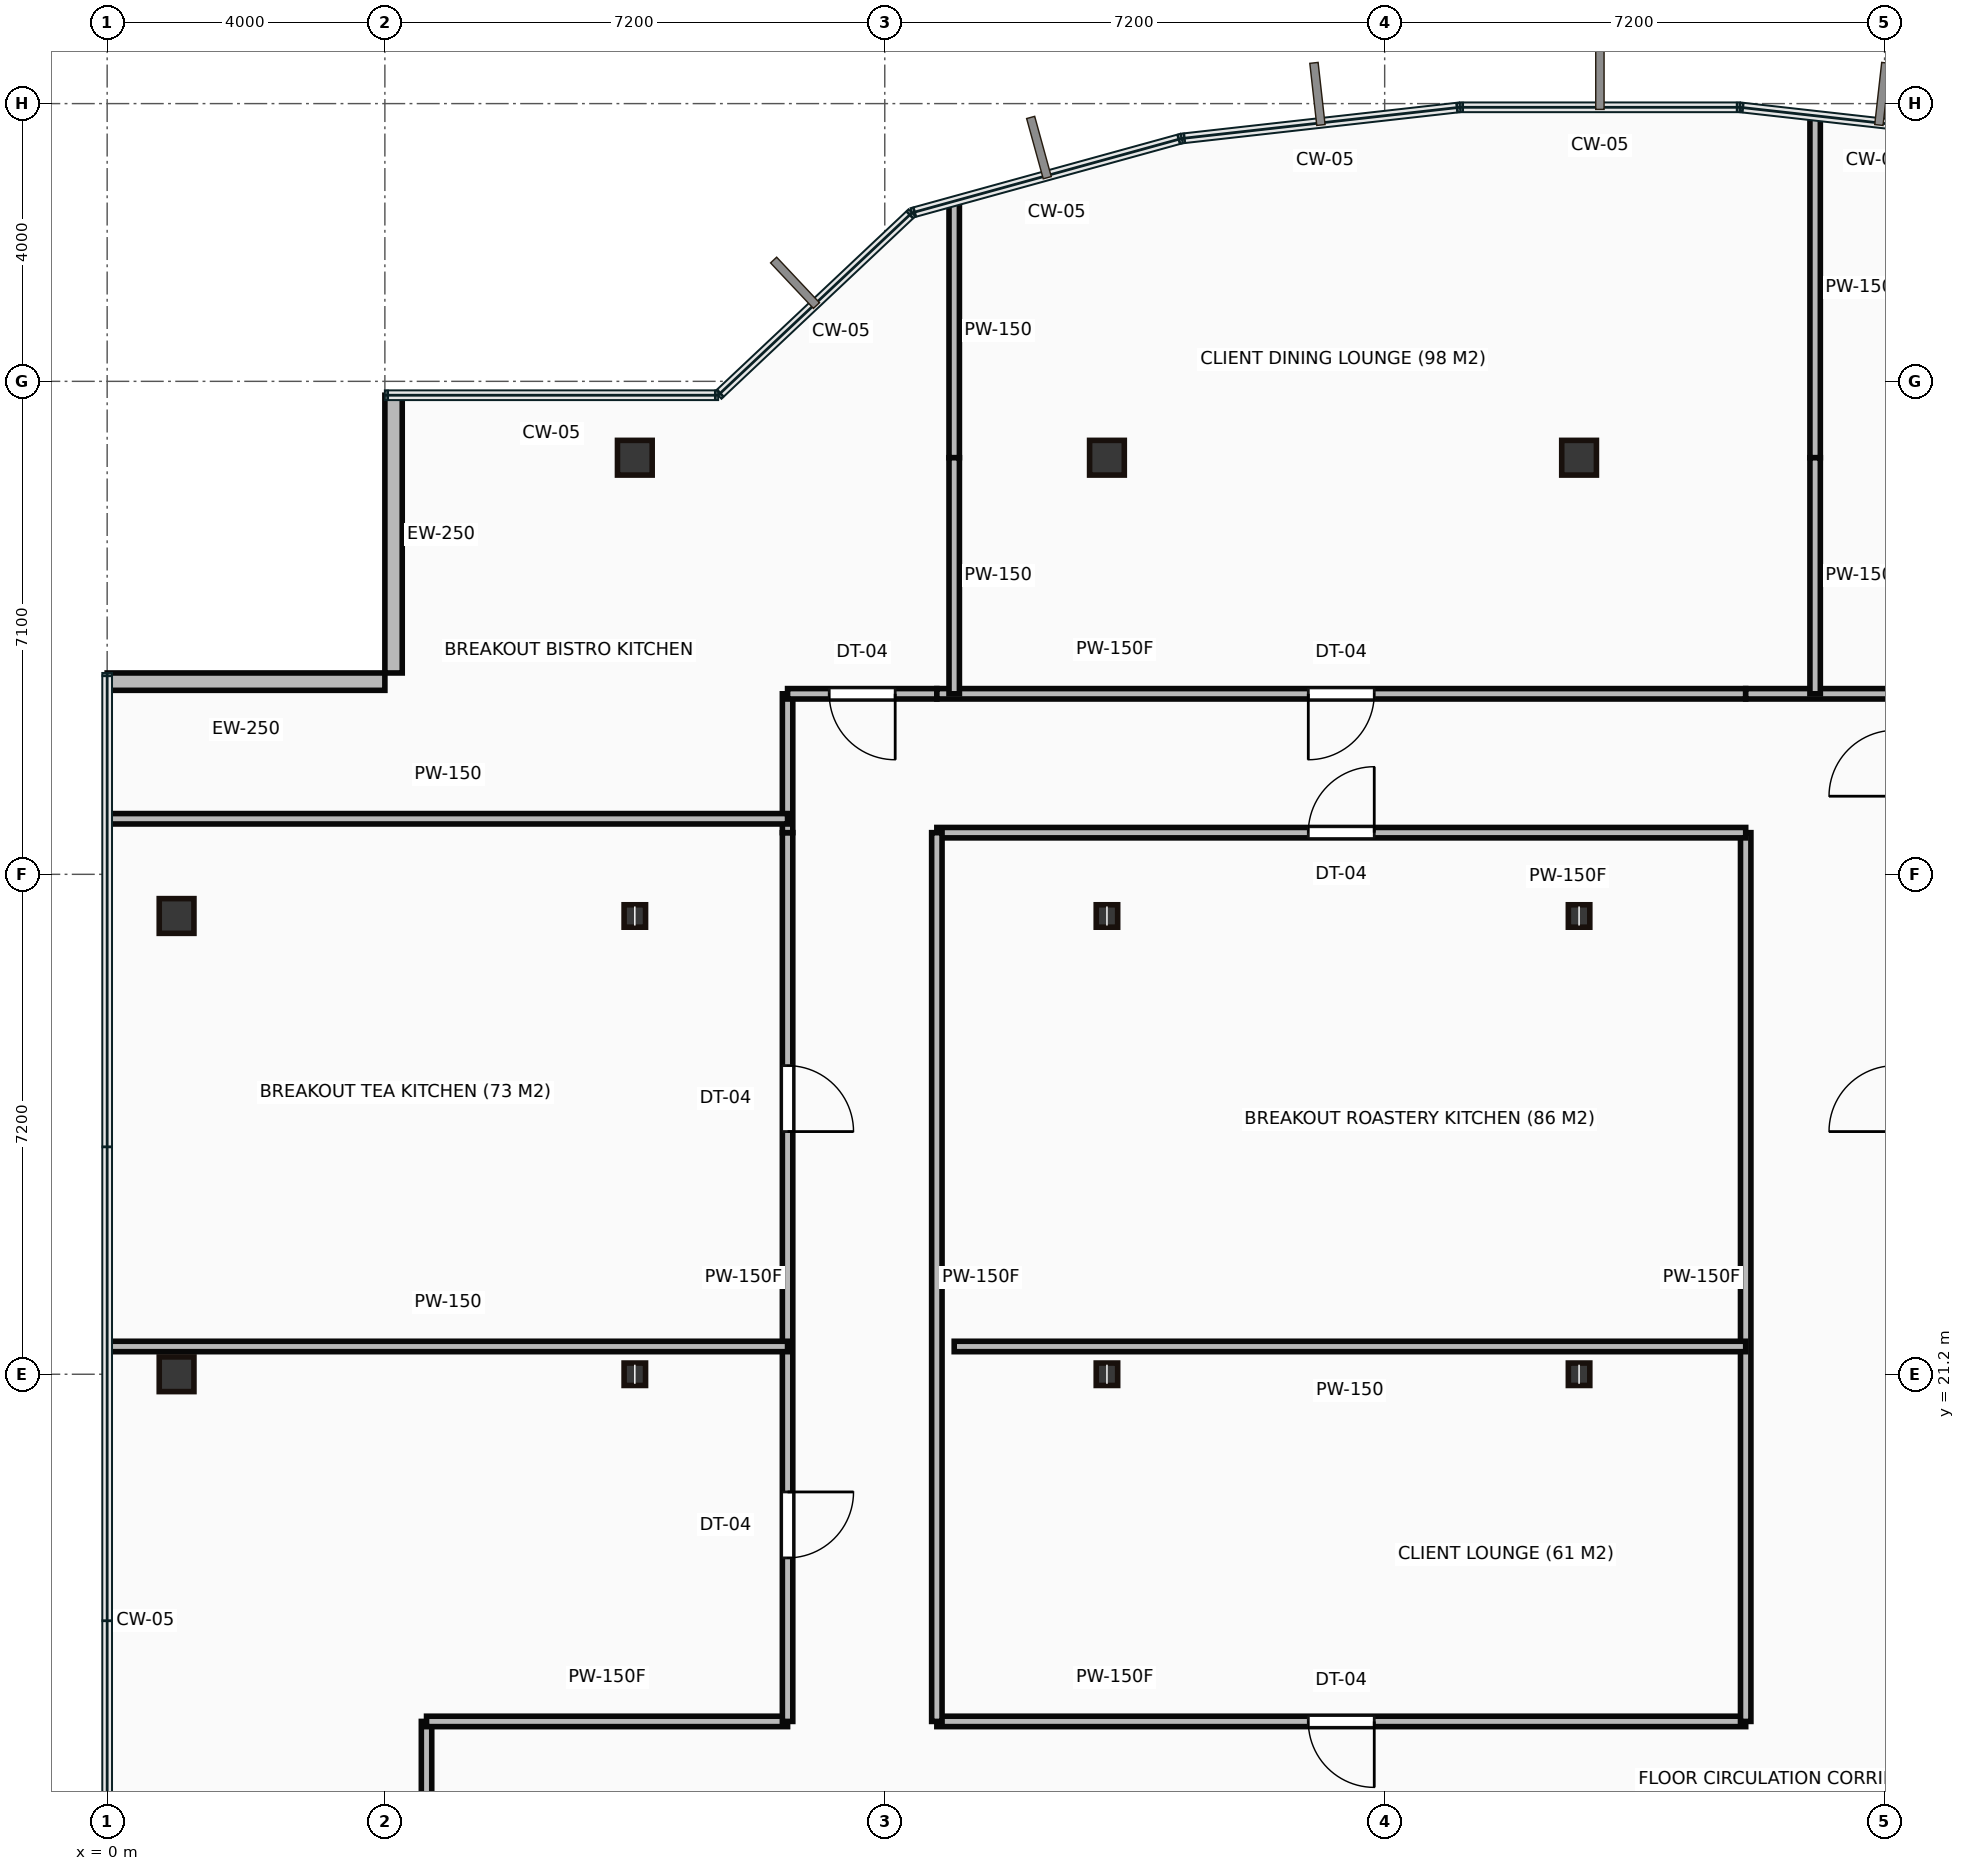
"""IFC4 building model, lengths in metres.
Left out: names, types, materials, properties, quantities, classifications, styles, units other than length and angle.
Written with IfcOpenShell. Run it as: python <this file> out.ifc"""

import sys

from ifc_helpers import new_model, si_unit, direction, frame, frame_2d, origin, origin_2d, place, context, subcontext, project, spatial, rectangle, hollow_rectangle, i_section, extrude, source, transform, mapped, element, fill, save


model = new_model("IFC4")
c1 = context("Model", 3, precision=1e-05, world=origin(), true_north=direction((0.0, 1.0)))
c2 = subcontext(c1, "Body", "Model", "MODEL_VIEW")
j1 = project(units=[si_unit("LENGTHUNIT", "METRE"), si_unit("PLANEANGLEUNIT", "RADIAN")], contexts=[c1])
p1 = place(None, origin())
s1 = spatial("IfcSite", under=j1, at=p1, CompositionType="ELEMENT")
p2 = place(p1, origin())
s2 = spatial("IfcBuilding", under=s1, at=p2, CompositionType="ELEMENT")
p3 = place(p2, frame((0.0, 0.0, 277.05)))
s3 = spatial("IfcBuildingStorey", under=s2, at=p3, CompositionType="ELEMENT", Elevation=277.05)
m1 = source(origin(), c2, "Body", "SweptSolid", [
    extrude(hollow_rectangle(XDim=0.5, YDim=0.5, WallThickness=0.022, at=origin_2d()), origin(), (0.0, 0.0, 1.0), 3.65),
])
for number, where, z_axis, x_axis in (
    (1, (1.0, 21.2, 0.0), (0.0, 0.0, 1.0), (1.0, 0.0, 0.0)),
    (2, (1.0, 27.8, 0.0), (0.0, 0.0, 1.0), (1.0, 0.0, 0.0)),
):
    element("IfcColumn", number, at=place(p3, frame(where, z_axis=z_axis, x_axis=x_axis)), inside=s3, PredefinedType="COLUMN", context=c2, shape_type="MappedRepresentation", body=[
        mapped(m1, transform((0.0, 0.0, 0.0))),
    ])
m2 = source(origin(), c2, "Body", "SweptSolid", [
    extrude(i_section(OverallWidth=0.309, OverallDepth=0.323, WebThickness=0.014, FlangeThickness=0.023, at=origin_2d()), origin(), (0.0, 0.0, 1.0), 3.65),
])
for number, where, z_axis, x_axis in (
    (3, (7.6, 21.2, 0.0), (0.0, 0.0, 1.0), (1.0, 0.0, 0.0)),
    (4, (7.6, 27.8, 0.0), (0.0, 0.0, 1.0), (1.0, 0.0, 0.0)),
):
    element("IfcColumn", number, at=place(p3, frame(where, z_axis=z_axis, x_axis=x_axis)), inside=s3, PredefinedType="COLUMN", context=c2, shape_type="MappedRepresentation", body=[
        mapped(m2, transform((0.0, 0.0, 0.0))),
    ])
p4 = place(p3, frame((7.6, 34.4, 0.0), z_axis=(0.0, 0.0, 1.0), x_axis=(1.0, 0.0, 0.0)))
e5 = element("IfcColumn", 5, at=p4, inside=s3, PredefinedType="COLUMN", context=c2, shape_type="MappedRepresentation", body=[
    mapped(m1, transform((0.0, 0.0, 0.0))),
])
for number, where, z_axis, x_axis in (
    (6, (14.4, 21.2, 0.0), (0.0, 0.0, 1.0), (1.0, 0.0, 0.0)),
    (7, (14.4, 27.8, 0.0), (0.0, 0.0, 1.0), (1.0, 0.0, 0.0)),
):
    element("IfcColumn", number, at=place(p3, frame(where, z_axis=z_axis, x_axis=x_axis)), inside=s3, PredefinedType="COLUMN", context=c2, shape_type="MappedRepresentation", body=[
        mapped(m2, transform((0.0, 0.0, 0.0))),
    ])
p5 = place(p3, frame((14.4, 34.4, 0.0), z_axis=(0.0, 0.0, 1.0), x_axis=(1.0, 0.0, 0.0)))
e8 = element("IfcColumn", 8, at=p5, inside=s3, PredefinedType="COLUMN", context=c2, shape_type="MappedRepresentation", body=[
    mapped(m1, transform((0.0, 0.0, 0.0))),
])
for number, where, z_axis, x_axis in (
    (9, (21.2, 21.2, 0.0), (0.0, 0.0, 1.0), (1.0, 0.0, 0.0)),
    (10, (21.2, 27.8, 0.0), (0.0, 0.0, 1.0), (1.0, 0.0, 0.0)),
):
    element("IfcColumn", number, at=place(p3, frame(where, z_axis=z_axis, x_axis=x_axis)), inside=s3, PredefinedType="COLUMN", context=c2, shape_type="MappedRepresentation", body=[
        mapped(m2, transform((0.0, 0.0, 0.0))),
    ])
p6 = place(p3, frame((21.2, 34.4, 0.0), z_axis=(0.0, 0.0, 1.0), x_axis=(1.0, 0.0, 0.0)))
e11 = element("IfcColumn", 11, at=p6, inside=s3, PredefinedType="COLUMN", context=c2, shape_type="MappedRepresentation", body=[
    mapped(m1, transform((0.0, 0.0, 0.0))),
])
m3 = source(origin(), c2, "Body", "SweptSolid", [
    extrude(rectangle(XDim=4.0, YDim=0.25, at=frame_2d((2.0, 0.0))), origin(), (0.0, 0.0, 1.0), 3.4),
])
for number, where, z_axis, x_axis in (
    (12, (4.125, 35.3, 0.0), (0.0, 0.0, 1.0), (0.0, -1.0, 0.0)),
    (13, (4.0, 31.175, 0.0), (0.0, 0.0, 1.0), (-1.0, 0.0, 0.0)),
):
    element("IfcWall", number, at=place(p3, frame(where, z_axis=z_axis, x_axis=x_axis)), inside=s3, PredefinedType="STANDARD", context=c2, shape_type="MappedRepresentation", body=[
        mapped(m3, transform((0.0, 0.0, 0.0))),
    ])
m4 = source(origin(), c2, "Body", "SweptSolid", [
    extrude(rectangle(XDim=2.12, YDim=0.15, at=frame_2d((1.06, 0.0))), origin(), (0.0, 0.0, 1.0), 3.4),
])
p7 = place(p3, frame((4.6, 14.08, 0.0), z_axis=(0.0, 0.0, 1.0), x_axis=(0.0, 1.0, 0.0)))
e14 = element("IfcWall", 14, at=p7, inside=s3, PredefinedType="PARTITIONING", context=c2, shape_type="MappedRepresentation", body=[
    mapped(m4, transform((0.0, 0.0, 0.0))),
])
m5 = source(origin(), c2, "Body", "SweptSolid", [
    extrude(rectangle(XDim=5.2, YDim=0.15, at=frame_2d((2.6, 0.0))), origin(), (0.0, 0.0, 1.0), 3.4),
])
p8 = place(p3, frame((4.6, 16.2, 0.0), z_axis=(0.0, 0.0, 1.0), x_axis=(1.0, 0.0, 0.0)))
e15 = element("IfcWall", 15, at=p8, inside=s3, PredefinedType="PARTITIONING", context=c2, shape_type="MappedRepresentation", body=[
    mapped(m5, transform((0.0, 0.0, 0.0))),
])
m6 = source(origin(), c2, "Body", "SweptSolid", [
    extrude(rectangle(XDim=12.8, YDim=0.15, at=frame_2d((6.4, 0.0))), origin(), (0.0, 0.0, 1.0), 3.4),
])
p9 = place(p3, frame((9.8, 16.2, 0.0), z_axis=(0.0, 0.0, 1.0), x_axis=(0.0, 1.0, 0.0)))
e16 = element("IfcWall", 16, at=p9, inside=s3, PredefinedType="PARTITIONING", context=c2, shape_type="MappedRepresentation", body=[
    mapped(m6, transform((0.0, 0.0, 0.0))),
])
p10 = place(p9, frame((2.355, 0.0, 0.0)))
e17 = element("IfcOpeningElement", 17, at=p10, cuts=e16, PredefinedType="OPENING", context=c2, shape_type="SweptSolid", body=[
    extrude(rectangle(XDim=0.95, YDim=2.15, at=frame_2d((0.475, 1.075))), frame((0.0, 0.085, 0.0), z_axis=(0.0, -1.0, 0.0), x_axis=(1.0, 0.0, 0.0)), (0.0, 0.0, 1.0), 0.17),
])
p11 = place(p9, frame((8.495, 0.0, 0.0)))
e18 = element("IfcOpeningElement", 18, at=p11, cuts=e16, PredefinedType="OPENING", context=c2, shape_type="SweptSolid", body=[
    extrude(rectangle(XDim=0.95, YDim=2.15, at=frame_2d((0.475, 1.075))), frame((0.0, 0.085, 0.0), z_axis=(0.0, -1.0, 0.0), x_axis=(1.0, 0.0, 0.0)), (0.0, 0.0, 1.0), 0.17),
])
m7 = source(origin(), c2, "Body", "SweptSolid", [
    extrude(rectangle(XDim=2.0, YDim=0.15, at=frame_2d((1.0, 0.0))), origin(), (0.0, 0.0, 1.0), 3.4),
])
p12 = place(p3, frame((9.8, 29.0, 0.0), z_axis=(0.0, 0.0, 1.0), x_axis=(0.0, 1.0, 0.0)))
e19 = element("IfcWall", 19, at=p12, inside=s3, PredefinedType="PARTITIONING", context=c2, shape_type="MappedRepresentation", body=[
    mapped(m7, transform((0.0, 0.0, 0.0))),
])
m8 = source(origin(), c2, "Body", "SweptSolid", [
    extrude(rectangle(XDim=2.15, YDim=0.15, at=frame_2d((1.075, 0.0))), origin(), (0.0, 0.0, 1.0), 3.4),
])
p13 = place(p3, frame((9.8, 31.0, 0.0), z_axis=(0.0, 0.0, 1.0), x_axis=(1.0, 0.0, 0.0)))
e20 = element("IfcWall", 20, at=p13, inside=s3, PredefinedType="PARTITIONING", context=c2, shape_type="MappedRepresentation", body=[
    mapped(m8, transform((0.0, 0.0, 0.0))),
])
p14 = place(p13, frame((0.6, 0.0, 0.0)))
e21 = element("IfcOpeningElement", 21, at=p14, cuts=e20, PredefinedType="OPENING", context=c2, shape_type="SweptSolid", body=[
    extrude(rectangle(XDim=0.95, YDim=2.15, at=frame_2d((0.475, 1.075))), frame((0.0, 0.085, 0.0), z_axis=(0.0, -1.0, 0.0), x_axis=(1.0, 0.0, 0.0)), (0.0, 0.0, 1.0), 0.17),
])
m9 = source(origin(), c2, "Body", "SweptSolid", [
    extrude(rectangle(XDim=11.65, YDim=0.15, at=frame_2d((5.825, 0.0))), origin(), (0.0, 0.0, 1.0), 3.4),
])
p15 = place(p3, frame((11.95, 31.0, 0.0), z_axis=(0.0, 0.0, 1.0), x_axis=(1.0, 0.0, 0.0)))
e22 = element("IfcWall", 22, at=p15, inside=s3, PredefinedType="PARTITIONING", context=c2, shape_type="MappedRepresentation", body=[
    mapped(m9, transform((0.0, 0.0, 0.0))),
])
p16 = place(p15, frame((5.35, 0.0, 0.0)))
e23 = element("IfcOpeningElement", 23, at=p16, cuts=e22, PredefinedType="OPENING", context=c2, shape_type="SweptSolid", body=[
    extrude(rectangle(XDim=0.95, YDim=2.15, at=frame_2d((0.475, 1.075))), frame((0.0, 0.085, 0.0), z_axis=(0.0, -1.0, 0.0), x_axis=(1.0, 0.0, 0.0)), (0.0, 0.0, 1.0), 0.17),
])
p17 = place(p3, frame((23.6, 31.0, 0.0), z_axis=(0.0, 0.0, 1.0), x_axis=(1.0, 0.0, 0.0)))
e24 = element("IfcWall", 24, at=p17, inside=s3, PredefinedType="PARTITIONING", context=c2, shape_type="MappedRepresentation", body=[
    mapped(m8, transform((0.0, 0.0, 0.0))),
])
p18 = place(p3, frame((11.95, 16.2, 0.0), z_axis=(0.0, 0.0, 1.0), x_axis=(1.0, 0.0, 0.0)))
e25 = element("IfcWall", 25, at=p18, inside=s3, PredefinedType="PARTITIONING", context=c2, shape_type="MappedRepresentation", body=[
    mapped(m9, transform((0.0, 0.0, 0.0))),
])
p19 = place(p18, frame((5.35, 0.0, 0.0)))
e26 = element("IfcOpeningElement", 26, at=p19, cuts=e25, PredefinedType="OPENING", context=c2, shape_type="SweptSolid", body=[
    extrude(rectangle(XDim=0.95, YDim=2.15, at=frame_2d((0.475, 1.075))), frame((0.0, 0.085, 0.0), z_axis=(0.0, -1.0, 0.0), x_axis=(1.0, 0.0, 0.0)), (0.0, 0.0, 1.0), 0.17),
])
p20 = place(p3, frame((23.6, 16.2, 0.0), z_axis=(0.0, 0.0, 1.0), x_axis=(0.0, 1.0, 0.0)))
e27 = element("IfcWall", 27, at=p20, inside=s3, PredefinedType="PARTITIONING", context=c2, shape_type="MappedRepresentation", body=[
    mapped(m6, transform((0.0, 0.0, 0.0))),
])
p21 = place(p3, frame((23.6, 29.0, 0.0), z_axis=(0.0, 0.0, 1.0), x_axis=(-1.0, 0.0, 0.0)))
e28 = element("IfcWall", 28, at=p21, inside=s3, PredefinedType="PARTITIONING", context=c2, shape_type="MappedRepresentation", body=[
    mapped(m9, transform((0.0, 0.0, 0.0))),
])
p22 = place(p21, frame((5.35, 0.0, 0.0)))
e29 = element("IfcOpeningElement", 29, at=p22, cuts=e28, PredefinedType="OPENING", context=c2, shape_type="SweptSolid", body=[
    extrude(rectangle(XDim=0.95, YDim=2.15, at=frame_2d((0.475, 1.075))), frame((0.0, 0.085, 0.0), z_axis=(0.0, -1.0, 0.0), x_axis=(1.0, 0.0, 0.0)), (0.0, 0.0, 1.0), 0.17),
])
p23 = place(p3, frame((11.95, 29.0, 0.0), z_axis=(0.0, 0.0, 1.0), x_axis=(0.0, -1.0, 0.0)))
e30 = element("IfcWall", 30, at=p23, inside=s3, PredefinedType="PARTITIONING", context=c2, shape_type="MappedRepresentation", body=[
    mapped(m6, transform((0.0, 0.0, 0.0))),
])
m10 = source(origin(), c2, "Body", "SweptSolid", [
    extrude(rectangle(XDim=9.78, YDim=0.15, at=frame_2d((4.89, 0.0))), origin(), (0.0, 0.0, 1.0), 3.4),
])
for number, where, z_axis, x_axis in (
    (31, (0.02, 21.6, 0.0), (0.0, 0.0, 1.0), (1.0, 0.0, 0.0)),
    (32, (0.02, 29.2, 0.0), (0.0, 0.0, 1.0), (1.0, 0.0, 0.0)),
):
    element("IfcWall", number, at=place(p3, frame(where, z_axis=z_axis, x_axis=x_axis)), inside=s3, PredefinedType="PARTITIONING", context=c2, shape_type="MappedRepresentation", body=[
        mapped(m10, transform((0.0, 0.0, 0.0))),
    ])
m11 = source(origin(), c2, "Body", "SweptSolid", [
    extrude(rectangle(XDim=11.4, YDim=0.15, at=frame_2d((5.7, 0.0))), origin(), (0.0, 0.0, 1.0), 3.4),
])
p24 = place(p3, frame((23.6, 21.6, 0.0), z_axis=(0.0, 0.0, 1.0), x_axis=(-1.0, 0.0, 0.0)))
e33 = element("IfcWall", 33, at=p24, inside=s3, PredefinedType="PARTITIONING", context=c2, shape_type="MappedRepresentation", body=[
    mapped(m11, transform((0.0, 0.0, 0.0))),
])
m12 = source(origin(), c2, "Body", "SweptSolid", [
    extrude(rectangle(XDim=3.674, YDim=0.15, at=frame_2d((1.837, 0.0))), origin(), (0.0, 0.0, 1.0), 3.4),
])
p25 = place(p3, frame((12.2, 38.074, 0.0), z_axis=(0.0, 0.0, 1.0), x_axis=(0.0, -1.0, 0.0)))
e34 = element("IfcWall", 34, at=p25, inside=s3, PredefinedType="PARTITIONING", context=c2, shape_type="MappedRepresentation", body=[
    mapped(m12, transform((0.0, 0.0, 0.0))),
])
m13 = source(origin(), c2, "Body", "SweptSolid", [
    extrude(rectangle(XDim=3.4, YDim=0.15, at=frame_2d((1.7, 0.0))), origin(), (0.0, 0.0, 1.0), 3.4),
])
p26 = place(p3, frame((12.2, 34.4, 0.0), z_axis=(0.0, 0.0, 1.0), x_axis=(0.0, -1.0, 0.0)))
e35 = element("IfcWall", 35, at=p26, inside=s3, PredefinedType="PARTITIONING", context=c2, shape_type="MappedRepresentation", body=[
    mapped(m13, transform((0.0, 0.0, 0.0))),
])
m14 = source(origin(), c2, "Body", "SweptSolid", [
    extrude(rectangle(XDim=4.905, YDim=0.15, at=frame_2d((2.453, 0.0))), origin(), (0.0, 0.0, 1.0), 3.4),
])
p27 = place(p3, frame((24.6, 39.305, 0.0), z_axis=(0.0, 0.0, 1.0), x_axis=(0.0, -1.0, 0.0)))
e36 = element("IfcWall", 36, at=p27, inside=s3, PredefinedType="PARTITIONING", context=c2, shape_type="MappedRepresentation", body=[
    mapped(m14, transform((0.0, 0.0, 0.0))),
])
p28 = place(p3, frame((24.6, 34.4, 0.0), z_axis=(0.0, 0.0, 1.0), x_axis=(0.0, -1.0, 0.0)))
e37 = element("IfcWall", 37, at=p28, inside=s3, PredefinedType="PARTITIONING", context=c2, shape_type="MappedRepresentation", body=[
    mapped(m13, transform((0.0, 0.0, 0.0))),
])
m15 = source(origin(), c2, "Body", "SweptSolid", [
    extrude(rectangle(XDim=0.95, YDim=2.15, at=frame_2d((0.475, 1.075))), frame((0.0, 0.025, 0.0), z_axis=(0.0, -1.0, 0.0), x_axis=(1.0, 0.0, 0.0)), (0.0, 0.0, 1.0), 0.05),
])
p29 = place(p10, origin())
e38 = element("IfcDoor", 38, at=p29, inside=s3, OperationType="SINGLE_SWING_RIGHT", PredefinedType="DOOR", context=c2, shape_type="MappedRepresentation", body=[
    mapped(m15, transform((0.0, 0.0, 0.0))),
])
fill(e17, e38)
p30 = place(p11, origin())
e39 = element("IfcDoor", 39, at=p30, inside=s3, OperationType="SINGLE_SWING_LEFT", PredefinedType="DOOR", context=c2, shape_type="MappedRepresentation", body=[
    mapped(m15, transform((0.0, 0.0, 0.0))),
])
fill(e18, e39)
p31 = place(p14, origin())
e40 = element("IfcDoor", 40, at=p31, inside=s3, OperationType="SINGLE_SWING_RIGHT", PredefinedType="DOOR", context=c2, shape_type="MappedRepresentation", body=[
    mapped(m15, transform((0.0, 0.0, 0.0))),
])
fill(e21, e40)
p32 = place(p22, origin())
e41 = element("IfcDoor", 41, at=p32, inside=s3, OperationType="SINGLE_SWING_LEFT", PredefinedType="DOOR", context=c2, shape_type="MappedRepresentation", body=[
    mapped(m15, transform((0.0, 0.0, 0.0))),
])
fill(e29, e41)
p33 = place(p19, origin())
e42 = element("IfcDoor", 42, at=p33, inside=s3, OperationType="SINGLE_SWING_RIGHT", PredefinedType="DOOR", context=c2, shape_type="MappedRepresentation", body=[
    mapped(m15, transform((0.0, 0.0, 0.0))),
])
fill(e26, e42)
p34 = place(p16, origin())
e43 = element("IfcDoor", 43, at=p34, inside=s3, OperationType="SINGLE_SWING_LEFT", PredefinedType="DOOR", context=c2, shape_type="MappedRepresentation", body=[
    mapped(m15, transform((0.0, 0.0, 0.0))),
])
fill(e23, e43)
save(model, sys.argv[1])
